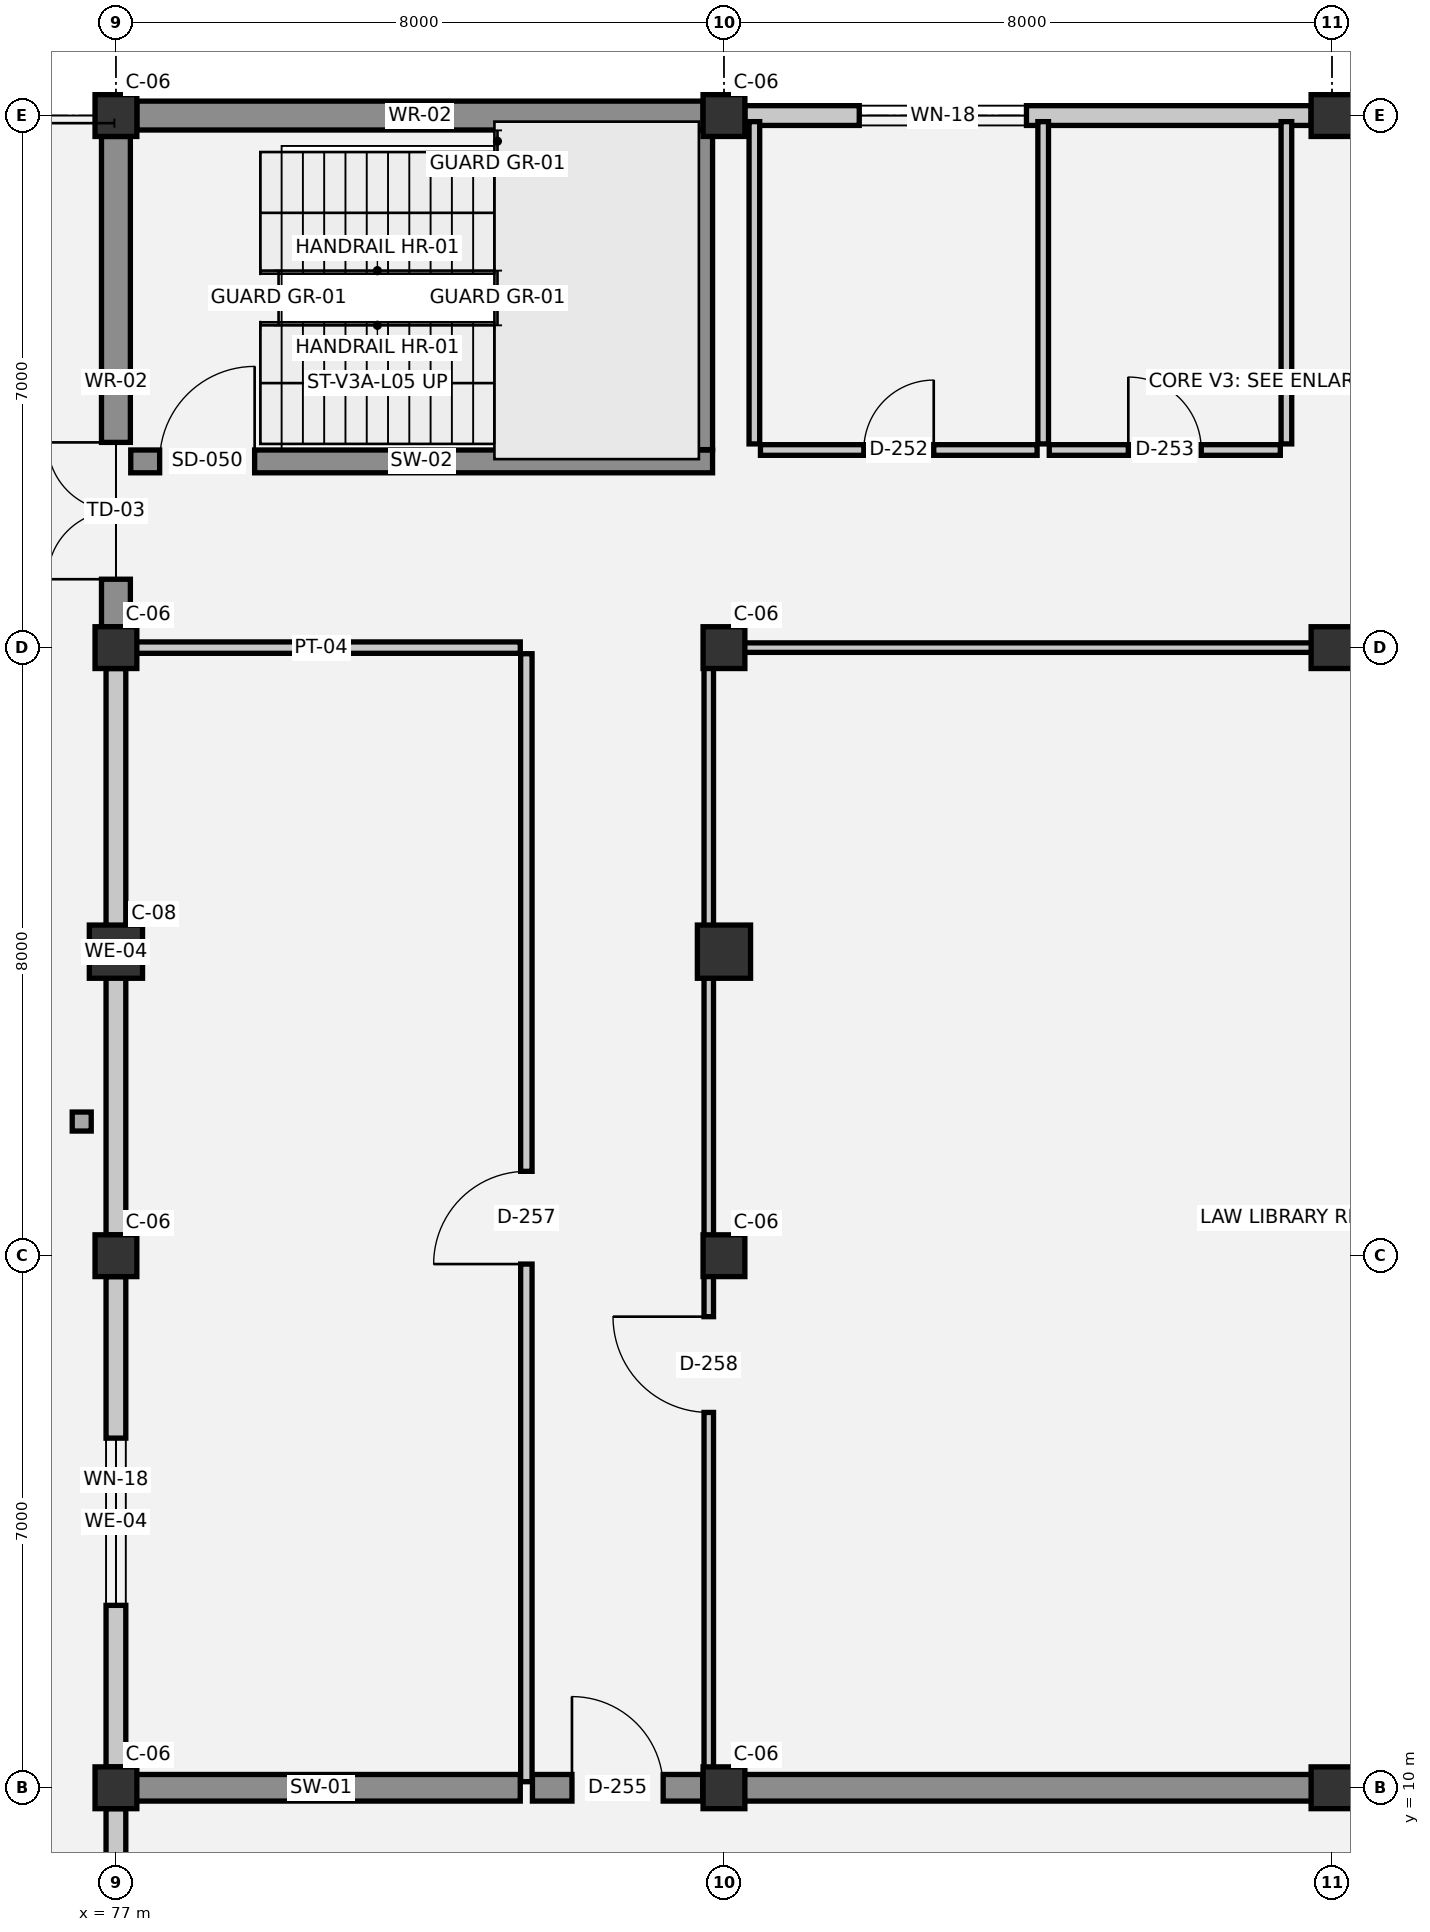
"""IFC4 building model, lengths in metres.
Left out: names, types, materials, properties, quantities, classifications, styles, units other than length and angle.
Written with IfcOpenShell. Run it as: python <this file> out.ifc"""

import sys

from ifc_helpers import new_model, si_unit, direction, frame, frame_2d, origin, origin_2d, place, context, subcontext, project, spatial, rectangle, circle, extrude, element, fill, save


model = new_model("IFC4")
c1 = context("Model", 3, precision=1e-05, world=origin(), true_north=direction((0.0, 1.0)))
c2 = subcontext(c1, "Body", "Model", "MODEL_VIEW")
j1 = project(units=[si_unit("LENGTHUNIT", "METRE"), si_unit("PLANEANGLEUNIT", "RADIAN")], contexts=[c1])
p1 = place(None, origin())
s1 = spatial("IfcSite", under=j1, at=p1, CompositionType="ELEMENT")
p2 = place(p1, origin())
s2 = spatial("IfcBuilding", under=s1, at=p2, CompositionType="ELEMENT")
p3 = place(p2, frame((0.0, 0.0, 18.3)))
s3 = spatial("IfcBuildingStorey", under=s2, at=p3, CompositionType="ELEMENT", Elevation=18.3)
for number, where, z_axis, x_axis in (
    (1, (77.0, 10.0, 0.0), (0.0, 0.0, 1.0), (1.0, 0.0, 0.0)),
    (2, (77.0, 17.0, 0.0), (0.0, 0.0, 1.0), (1.0, 0.0, 0.0)),
    (3, (77.0, 25.0, 0.0), (0.0, 0.0, 1.0), (1.0, 0.0, 0.0)),
    (4, (77.0, 32.0, 0.0), (0.0, 0.0, 1.0), (1.0, 0.0, 0.0)),
    (5, (85.0, 10.0, 0.0), (0.0, 0.0, 1.0), (1.0, 0.0, 0.0)),
    (6, (85.0, 17.0, 0.0), (0.0, 0.0, 1.0), (1.0, 0.0, 0.0)),
    (7, (85.0, 25.0, 0.0), (0.0, 0.0, 1.0), (1.0, 0.0, 0.0)),
    (8, (85.0, 32.0, 0.0), (0.0, 0.0, 1.0), (1.0, 0.0, 0.0)),
    (9, (93.0, 10.0, 0.0), (0.0, 0.0, 1.0), (1.0, 0.0, 0.0)),
    (10, (93.0, 25.0, 0.0), (0.0, 0.0, 1.0), (1.0, 0.0, 0.0)),
    (11, (93.0, 32.0, 0.0), (0.0, 0.0, 1.0), (1.0, 0.0, 0.0)),
):
    element("IfcColumn", number, at=place(p3, frame(where, z_axis=z_axis, x_axis=x_axis)), inside=s3, PredefinedType="COLUMN", context=c2, shape_type="SweptSolid", body=[
        extrude(rectangle(XDim=0.55, YDim=0.55, at=origin_2d()), origin(), (0.0, 0.0, 1.0), 3.75),
    ])
for number, where, z_axis, x_axis in (
    (12, (77.0, 21.0, 0.0), (0.0, 0.0, 1.0), (1.0, 0.0, 0.0)),
    (13, (85.0, 21.0, 0.0), (0.0, 0.0, 1.0), (1.0, 0.0, 0.0)),
):
    element("IfcColumn", number, at=place(p3, frame(where, z_axis=z_axis, x_axis=x_axis)), inside=s3, PredefinedType="COLUMN", context=c2, shape_type="SweptSolid", body=[
        extrude(circle(Radius=0.35, at=origin_2d()), origin(), (0.0, 0.0, 1.0), 3.75),
    ])
p4 = place(p3, frame((77.0, 4.275, 0.0), z_axis=(0.0, 0.0, 1.0), x_axis=(0.0, 1.0, 0.0)))
e14 = element("IfcWall", 14, at=p4, inside=s3, PredefinedType="SOLIDWALL", context=c2, shape_type="SweptSolid", body=[
    extrude(rectangle(XDim=5.45, YDim=0.26, at=frame_2d((2.725, 0.0))), origin(), (0.0, 0.0, 1.0), 2.69),
])
p5 = place(p4, frame((2.175, 0.0, 0.9)))
e15 = element("IfcOpeningElement", 15, at=p5, cuts=e14, PredefinedType="OPENING", context=c2, shape_type="SweptSolid", body=[
    extrude(rectangle(XDim=1.1, YDim=1.2, at=frame_2d((0.55, 0.6))), frame((0.0, 0.14, 0.0), z_axis=(0.0, -1.0, 0.0), x_axis=(1.0, 0.0, 0.0)), (0.0, 0.0, 1.0), 0.28),
])
p6 = place(p3, frame((77.0, 10.275, 0.0), z_axis=(0.0, 0.0, 1.0), x_axis=(0.0, 1.0, 0.0)))
e16 = element("IfcWall", 16, at=p6, inside=s3, PredefinedType="SOLIDWALL", context=c2, shape_type="SweptSolid", body=[
    extrude(rectangle(XDim=6.45, YDim=0.26, at=frame_2d((3.225, 0.0))), origin(), (0.0, 0.0, 1.0), 2.69),
])
p7 = place(p6, frame((2.125, 0.0, 0.9)))
e17 = element("IfcOpeningElement", 17, at=p7, cuts=e16, PredefinedType="OPENING", context=c2, shape_type="SweptSolid", body=[
    extrude(rectangle(XDim=2.2, YDim=1.0, at=frame_2d((1.1, 0.5))), frame((0.0, 0.14, 0.0), z_axis=(0.0, -1.0, 0.0), x_axis=(1.0, 0.0, 0.0)), (0.0, 0.0, 1.0), 0.28),
])
p8 = place(p3, frame((77.0, 17.275, 0.0), z_axis=(0.0, 0.0, 1.0), x_axis=(0.0, 1.0, 0.0)))
e18 = element("IfcWall", 18, at=p8, inside=s3, PredefinedType="SOLIDWALL", context=c2, shape_type="SweptSolid", body=[
    extrude(rectangle(XDim=7.45, YDim=0.26, at=frame_2d((3.725, 0.0))), origin(), (0.0, 0.0, 1.0), 2.69),
])
p9 = place(p3, frame((77.0, 25.275, 0.0), z_axis=(0.0, 0.0, 1.0), x_axis=(0.0, 1.0, 0.0)))
e19 = element("IfcWall", 19, at=p9, inside=s3, PredefinedType="STANDARD", context=c2, shape_type="SweptSolid", body=[
    extrude(rectangle(XDim=6.45, YDim=0.38, at=frame_2d((3.225, 0.0))), origin(), (0.0, 0.0, 1.0), 2.69),
])
p10 = place(p9, frame((0.625, 0.0, 0.0)))
e20 = element("IfcOpeningElement", 20, at=p10, cuts=e19, PredefinedType="OPENING", context=c2, shape_type="SweptSolid", body=[
    extrude(rectangle(XDim=1.8, YDim=2.2, at=frame_2d((0.9, 1.1))), frame((0.0, 0.2, 0.0), z_axis=(0.0, -1.0, 0.0), x_axis=(1.0, 0.0, 0.0)), (0.0, 0.0, 1.0), 0.4),
])
p11 = place(p3, frame((77.275, 32.0, 0.0), z_axis=(0.0, 0.0, 1.0), x_axis=(1.0, 0.0, 0.0)))
e21 = element("IfcWall", 21, at=p11, inside=s3, PredefinedType="STANDARD", context=c2, shape_type="SweptSolid", body=[
    extrude(rectangle(XDim=7.45, YDim=0.38, at=frame_2d((3.725, 0.0))), origin(), (0.0, 0.0, 1.0), 2.69),
])
p12 = place(p3, frame((85.275, 32.0, 0.0), z_axis=(0.0, 0.0, 1.0), x_axis=(1.0, 0.0, 0.0)))
e22 = element("IfcWall", 22, at=p12, inside=s3, PredefinedType="SOLIDWALL", context=c2, shape_type="SweptSolid", body=[
    extrude(rectangle(XDim=7.45, YDim=0.26, at=frame_2d((3.725, 0.0))), origin(), (0.0, 0.0, 1.0), 2.69),
])
p13 = place(p12, frame((1.505, 0.0, 0.9)))
e23 = element("IfcOpeningElement", 23, at=p13, cuts=e22, PredefinedType="OPENING", context=c2, shape_type="SweptSolid", body=[
    extrude(rectangle(XDim=2.2, YDim=1.0, at=frame_2d((1.1, 0.5))), frame((0.0, 0.14, 0.0), z_axis=(0.0, -1.0, 0.0), x_axis=(1.0, 0.0, 0.0)), (0.0, 0.0, 1.0), 0.28),
])
p14 = place(p3, frame((77.195, 27.45, 0.0), z_axis=(0.0, 0.0, 1.0), x_axis=(1.0, 0.0, 0.0)))
e24 = element("IfcWall", 24, at=p14, inside=s3, PredefinedType="SHEAR", context=c2, shape_type="SweptSolid", body=[
    extrude(rectangle(XDim=7.655, YDim=0.3, at=frame_2d((3.828, 0.0))), origin(), (0.0, 0.0, 1.0), 3.41),
])
p15 = place(p14, frame((0.38, 0.0, 0.0)))
e25 = element("IfcOpeningElement", 25, at=p15, cuts=e24, PredefinedType="OPENING", context=c2, shape_type="SweptSolid", body=[
    extrude(rectangle(XDim=1.25, YDim=2.15, at=frame_2d((0.625, 1.075))), frame((0.0, 0.16, 0.0), z_axis=(0.0, -1.0, 0.0), x_axis=(1.0, 0.0, 0.0)), (0.0, 0.0, 1.0), 0.32),
])
p16 = place(p3, frame((84.7, 27.605, 0.0), z_axis=(0.0, 0.0, 1.0), x_axis=(0.0, 1.0, 0.0)))
e26 = element("IfcWall", 26, at=p16, inside=s3, PredefinedType="SHEAR", context=c2, shape_type="SweptSolid", body=[
    extrude(rectangle(XDim=4.2, YDim=0.3, at=frame_2d((2.1, 0.0))), origin(), (0.0, 0.0, 1.0), 3.41),
])
p17 = place(p3, frame((77.08, 10.0, 0.0), z_axis=(0.0, 0.0, 1.0), x_axis=(1.0, 0.0, 0.0)))
e27 = element("IfcWall", 27, at=p17, inside=s3, PredefinedType="SHEAR", context=c2, shape_type="SweptSolid", body=[
    extrude(rectangle(XDim=5.24, YDim=0.35, at=frame_2d((2.62, 0.0))), origin(), (0.0, 0.0, 1.0), 3.39),
])
p18 = place(p3, frame((82.48, 10.0, 0.0), z_axis=(0.0, 0.0, 1.0), x_axis=(1.0, 0.0, 0.0)))
e28 = element("IfcWall", 28, at=p18, inside=s3, PredefinedType="SHEAR", context=c2, shape_type="SweptSolid", body=[
    extrude(rectangle(XDim=2.24, YDim=0.35, at=frame_2d((1.12, 0.0))), origin(), (0.0, 0.0, 1.0), 3.39),
])
p19 = place(p18, frame((0.52, 0.0, 0.0)))
e29 = element("IfcOpeningElement", 29, at=p19, cuts=e28, PredefinedType="OPENING", context=c2, shape_type="SweptSolid", body=[
    extrude(rectangle(XDim=1.2, YDim=2.15, at=frame_2d((0.6, 1.075))), frame((0.0, 0.185, 0.0), z_axis=(0.0, -1.0, 0.0), x_axis=(1.0, 0.0, 0.0)), (0.0, 0.0, 1.0), 0.37),
])
p20 = place(p3, frame((84.88, 10.0, 0.0), z_axis=(0.0, 0.0, 1.0), x_axis=(1.0, 0.0, 0.0)))
e30 = element("IfcWall", 30, at=p20, inside=s3, PredefinedType="SHEAR", context=c2, shape_type="SweptSolid", body=[
    extrude(rectangle(XDim=18.04, YDim=0.35, at=frame_2d((9.02, 0.0))), origin(), (0.0, 0.0, 1.0), 3.39),
])
p21 = place(p3, frame((77.08, 25.0, 0.0), z_axis=(0.0, 0.0, 1.0), x_axis=(1.0, 0.0, 0.0)))
e31 = element("IfcWall", 31, at=p21, inside=s3, PredefinedType="PARTITIONING", context=c2, shape_type="SweptSolid", body=[
    extrude(rectangle(XDim=5.24, YDim=0.15, at=frame_2d((2.62, 0.0))), origin(), (0.0, 0.0, 1.0), 2.81),
])
p22 = place(p3, frame((84.88, 25.0, 0.0), z_axis=(0.0, 0.0, 1.0), x_axis=(1.0, 0.0, 0.0)))
e32 = element("IfcWall", 32, at=p22, inside=s3, PredefinedType="PARTITIONING", context=c2, shape_type="SweptSolid", body=[
    extrude(rectangle(XDim=9.22, YDim=0.125, at=frame_2d((4.61, 0.0))), origin(), (0.0, 0.0, 1.0), 2.81),
])
p23 = place(p3, frame((85.48, 27.6, 0.0), z_axis=(0.0, 0.0, 1.0), x_axis=(1.0, 0.0, 0.0)))
e33 = element("IfcWall", 33, at=p23, inside=s3, PredefinedType="PLUMBINGWALL", context=c2, shape_type="SweptSolid", body=[
    extrude(rectangle(XDim=3.64, YDim=0.14, at=frame_2d((1.82, 0.0))), origin(), (0.0, 0.0, 1.0), 3.39),
])
p24 = place(p23, frame((1.36, 0.0, 0.0)))
e34 = element("IfcOpeningElement", 34, at=p24, cuts=e33, PredefinedType="OPENING", context=c2, shape_type="SweptSolid", body=[
    extrude(rectangle(XDim=0.92, YDim=2.1, at=frame_2d((0.46, 1.05))), frame((0.0, 0.08, 0.0), z_axis=(0.0, -1.0, 0.0), x_axis=(1.0, 0.0, 0.0)), (0.0, 0.0, 1.0), 0.16),
])
p25 = place(p3, frame((89.28, 27.6, 0.0), z_axis=(0.0, 0.0, 1.0), x_axis=(1.0, 0.0, 0.0)))
e35 = element("IfcWall", 35, at=p25, inside=s3, PredefinedType="PLUMBINGWALL", context=c2, shape_type="SweptSolid", body=[
    extrude(rectangle(XDim=3.04, YDim=0.14, at=frame_2d((1.52, 0.0))), origin(), (0.0, 0.0, 1.0), 3.39),
])
p26 = place(p25, frame((1.04, 0.0, 0.0)))
e36 = element("IfcOpeningElement", 36, at=p26, cuts=e35, PredefinedType="OPENING", context=c2, shape_type="SweptSolid", body=[
    extrude(rectangle(XDim=0.96, YDim=2.1, at=frame_2d((0.48, 1.05))), frame((0.0, 0.08, 0.0), z_axis=(0.0, -1.0, 0.0), x_axis=(1.0, 0.0, 0.0)), (0.0, 0.0, 1.0), 0.16),
])
p27 = place(p3, frame((82.4, 10.08, 0.0), z_axis=(0.0, 0.0, 1.0), x_axis=(0.0, 1.0, 0.0)))
e37 = element("IfcWall", 37, at=p27, inside=s3, PredefinedType="PARTITIONING", context=c2, shape_type="SweptSolid", body=[
    extrude(rectangle(XDim=14.84, YDim=0.15, at=frame_2d((7.42, 0.0))), origin(), (0.0, 0.0, 1.0), 3.39),
])
p28 = place(p27, frame((6.81, 0.0, 0.0)))
e38 = element("IfcOpeningElement", 38, at=p28, cuts=e37, PredefinedType="OPENING", context=c2, shape_type="SweptSolid", body=[
    extrude(rectangle(XDim=1.22, YDim=2.2, at=frame_2d((0.61, 1.1))), frame((0.0, 0.085, 0.0), z_axis=(0.0, -1.0, 0.0), x_axis=(1.0, 0.0, 0.0)), (0.0, 0.0, 1.0), 0.17),
])
p29 = place(p3, frame((84.8, 10.08, 0.0), z_axis=(0.0, 0.0, 1.0), x_axis=(0.0, 1.0, 0.0)))
e39 = element("IfcWall", 39, at=p29, inside=s3, PredefinedType="PARTITIONING", context=c2, shape_type="SweptSolid", body=[
    extrude(rectangle(XDim=14.84, YDim=0.125, at=frame_2d((7.42, 0.0))), origin(), (0.0, 0.0, 1.0), 2.86),
])
p30 = place(p29, frame((4.858, 0.0, 0.0)))
e40 = element("IfcOpeningElement", 40, at=p30, cuts=e39, PredefinedType="OPENING", context=c2, shape_type="SweptSolid", body=[
    extrude(rectangle(XDim=1.26, YDim=2.2, at=frame_2d((0.63, 1.1))), frame((0.0, 0.073, 0.0), z_axis=(0.0, -1.0, 0.0), x_axis=(1.0, 0.0, 0.0)), (0.0, 0.0, 1.0), 0.145),
])
for number, where, z_axis, x_axis in (
    (41, (85.4, 27.68, 0.0), (0.0, 0.0, 1.0), (0.0, 1.0, 0.0)),
    (42, (89.2, 27.68, 0.0), (0.0, 0.0, 1.0), (0.0, 1.0, 0.0)),
    (43, (92.4, 27.68, 0.0), (0.0, 0.0, 1.0), (0.0, 1.0, 0.0)),
):
    element("IfcWall", number, at=place(p3, frame(where, z_axis=z_axis, x_axis=x_axis)), inside=s3, PredefinedType="PLUMBINGWALL", context=c2, shape_type="SweptSolid", body=[
        extrude(rectangle(XDim=4.24, YDim=0.14, at=frame_2d((2.12, 0.0))), origin(), (0.0, 0.0, 1.0), 3.39),
    ])
p31 = place(p7, origin())
e44 = element("IfcWindow", 44, at=p31, inside=s3, PartitioningType="SINGLE_PANEL", PredefinedType="WINDOW", context=c2, shape_type="SweptSolid", body=[
    extrude(rectangle(XDim=2.2, YDim=1.0, at=frame_2d((1.1, 0.5))), frame((0.0, 0.03, 0.0), z_axis=(0.0, -1.0, 0.0), x_axis=(1.0, 0.0, 0.0)), (0.0, 0.0, 1.0), 0.06),
])
fill(e17, e44)
p32 = place(p10, origin())
e45 = element("IfcDoor", 45, at=p32, inside=s3, OperationType="DOUBLE_DOOR_SINGLE_SWING", PredefinedType="DOOR", context=c2, shape_type="SweptSolid", body=[
    extrude(rectangle(XDim=1.8, YDim=2.2, at=frame_2d((0.9, 1.1))), frame((0.0, 0.025, 0.0), z_axis=(0.0, -1.0, 0.0), x_axis=(1.0, 0.0, 0.0)), (0.0, 0.0, 1.0), 0.05),
])
fill(e20, e45)
p33 = place(p13, origin())
e46 = element("IfcWindow", 46, at=p33, inside=s3, PartitioningType="SINGLE_PANEL", PredefinedType="WINDOW", context=c2, shape_type="SweptSolid", body=[
    extrude(rectangle(XDim=2.2, YDim=1.0, at=frame_2d((1.1, 0.5))), frame((0.0, 0.03, 0.0), z_axis=(0.0, -1.0, 0.0), x_axis=(1.0, 0.0, 0.0)), (0.0, 0.0, 1.0), 0.06),
])
fill(e23, e46)
p34 = place(p15, origin())
e47 = element("IfcDoor", 47, at=p34, inside=s3, OperationType="SINGLE_SWING_RIGHT", PredefinedType="DOOR", context=c2, shape_type="SweptSolid", body=[
    extrude(rectangle(XDim=1.25, YDim=2.15, at=frame_2d((0.625, 1.075))), frame((0.0, 0.025, 0.0), z_axis=(0.0, -1.0, 0.0), x_axis=(1.0, 0.0, 0.0)), (0.0, 0.0, 1.0), 0.05),
])
fill(e25, e47)
p35 = place(p24, origin())
e48 = element("IfcDoor", 48, at=p35, inside=s3, OperationType="SINGLE_SWING_RIGHT", PredefinedType="DOOR", context=c2, shape_type="SweptSolid", body=[
    extrude(rectangle(XDim=0.92, YDim=2.1, at=frame_2d((0.46, 1.05))), frame((0.0, 0.025, 0.0), z_axis=(0.0, -1.0, 0.0), x_axis=(1.0, 0.0, 0.0)), (0.0, 0.0, 1.0), 0.05),
])
fill(e34, e48)
p36 = place(p26, origin())
e49 = element("IfcDoor", 49, at=p36, inside=s3, OperationType="SINGLE_SWING_LEFT", PredefinedType="DOOR", context=c2, shape_type="SweptSolid", body=[
    extrude(rectangle(XDim=0.96, YDim=2.1, at=frame_2d((0.48, 1.05))), frame((0.0, 0.025, 0.0), z_axis=(0.0, -1.0, 0.0), x_axis=(1.0, 0.0, 0.0)), (0.0, 0.0, 1.0), 0.05),
])
fill(e36, e49)
p37 = place(p19, origin())
e50 = element("IfcDoor", 50, at=p37, inside=s3, OperationType="SINGLE_SWING_LEFT", PredefinedType="DOOR", context=c2, shape_type="SweptSolid", body=[
    extrude(rectangle(XDim=1.2, YDim=2.15, at=frame_2d((0.6, 1.075))), frame((0.0, 0.025, 0.0), z_axis=(0.0, -1.0, 0.0), x_axis=(1.0, 0.0, 0.0)), (0.0, 0.0, 1.0), 0.05),
])
fill(e29, e50)
p38 = place(p28, origin())
e51 = element("IfcDoor", 51, at=p38, inside=s3, OperationType="SINGLE_SWING_LEFT", PredefinedType="DOOR", context=c2, shape_type="SweptSolid", body=[
    extrude(rectangle(XDim=1.22, YDim=2.2, at=frame_2d((0.61, 1.1))), frame((0.0, 0.025, 0.0), z_axis=(0.0, -1.0, 0.0), x_axis=(1.0, 0.0, 0.0)), (0.0, 0.0, 1.0), 0.05),
])
fill(e38, e51)
p39 = place(p30, origin())
e52 = element("IfcDoor", 52, at=p39, inside=s3, OperationType="SINGLE_SWING_RIGHT", PredefinedType="DOOR", context=c2, shape_type="SweptSolid", body=[
    extrude(rectangle(XDim=1.26, YDim=2.2, at=frame_2d((0.63, 1.1))), frame((0.0, 0.025, 0.0), z_axis=(0.0, -1.0, 0.0), x_axis=(1.0, 0.0, 0.0)), (0.0, 0.0, 1.0), 0.05),
])
fill(e40, e52)
save(model, sys.argv[1])
